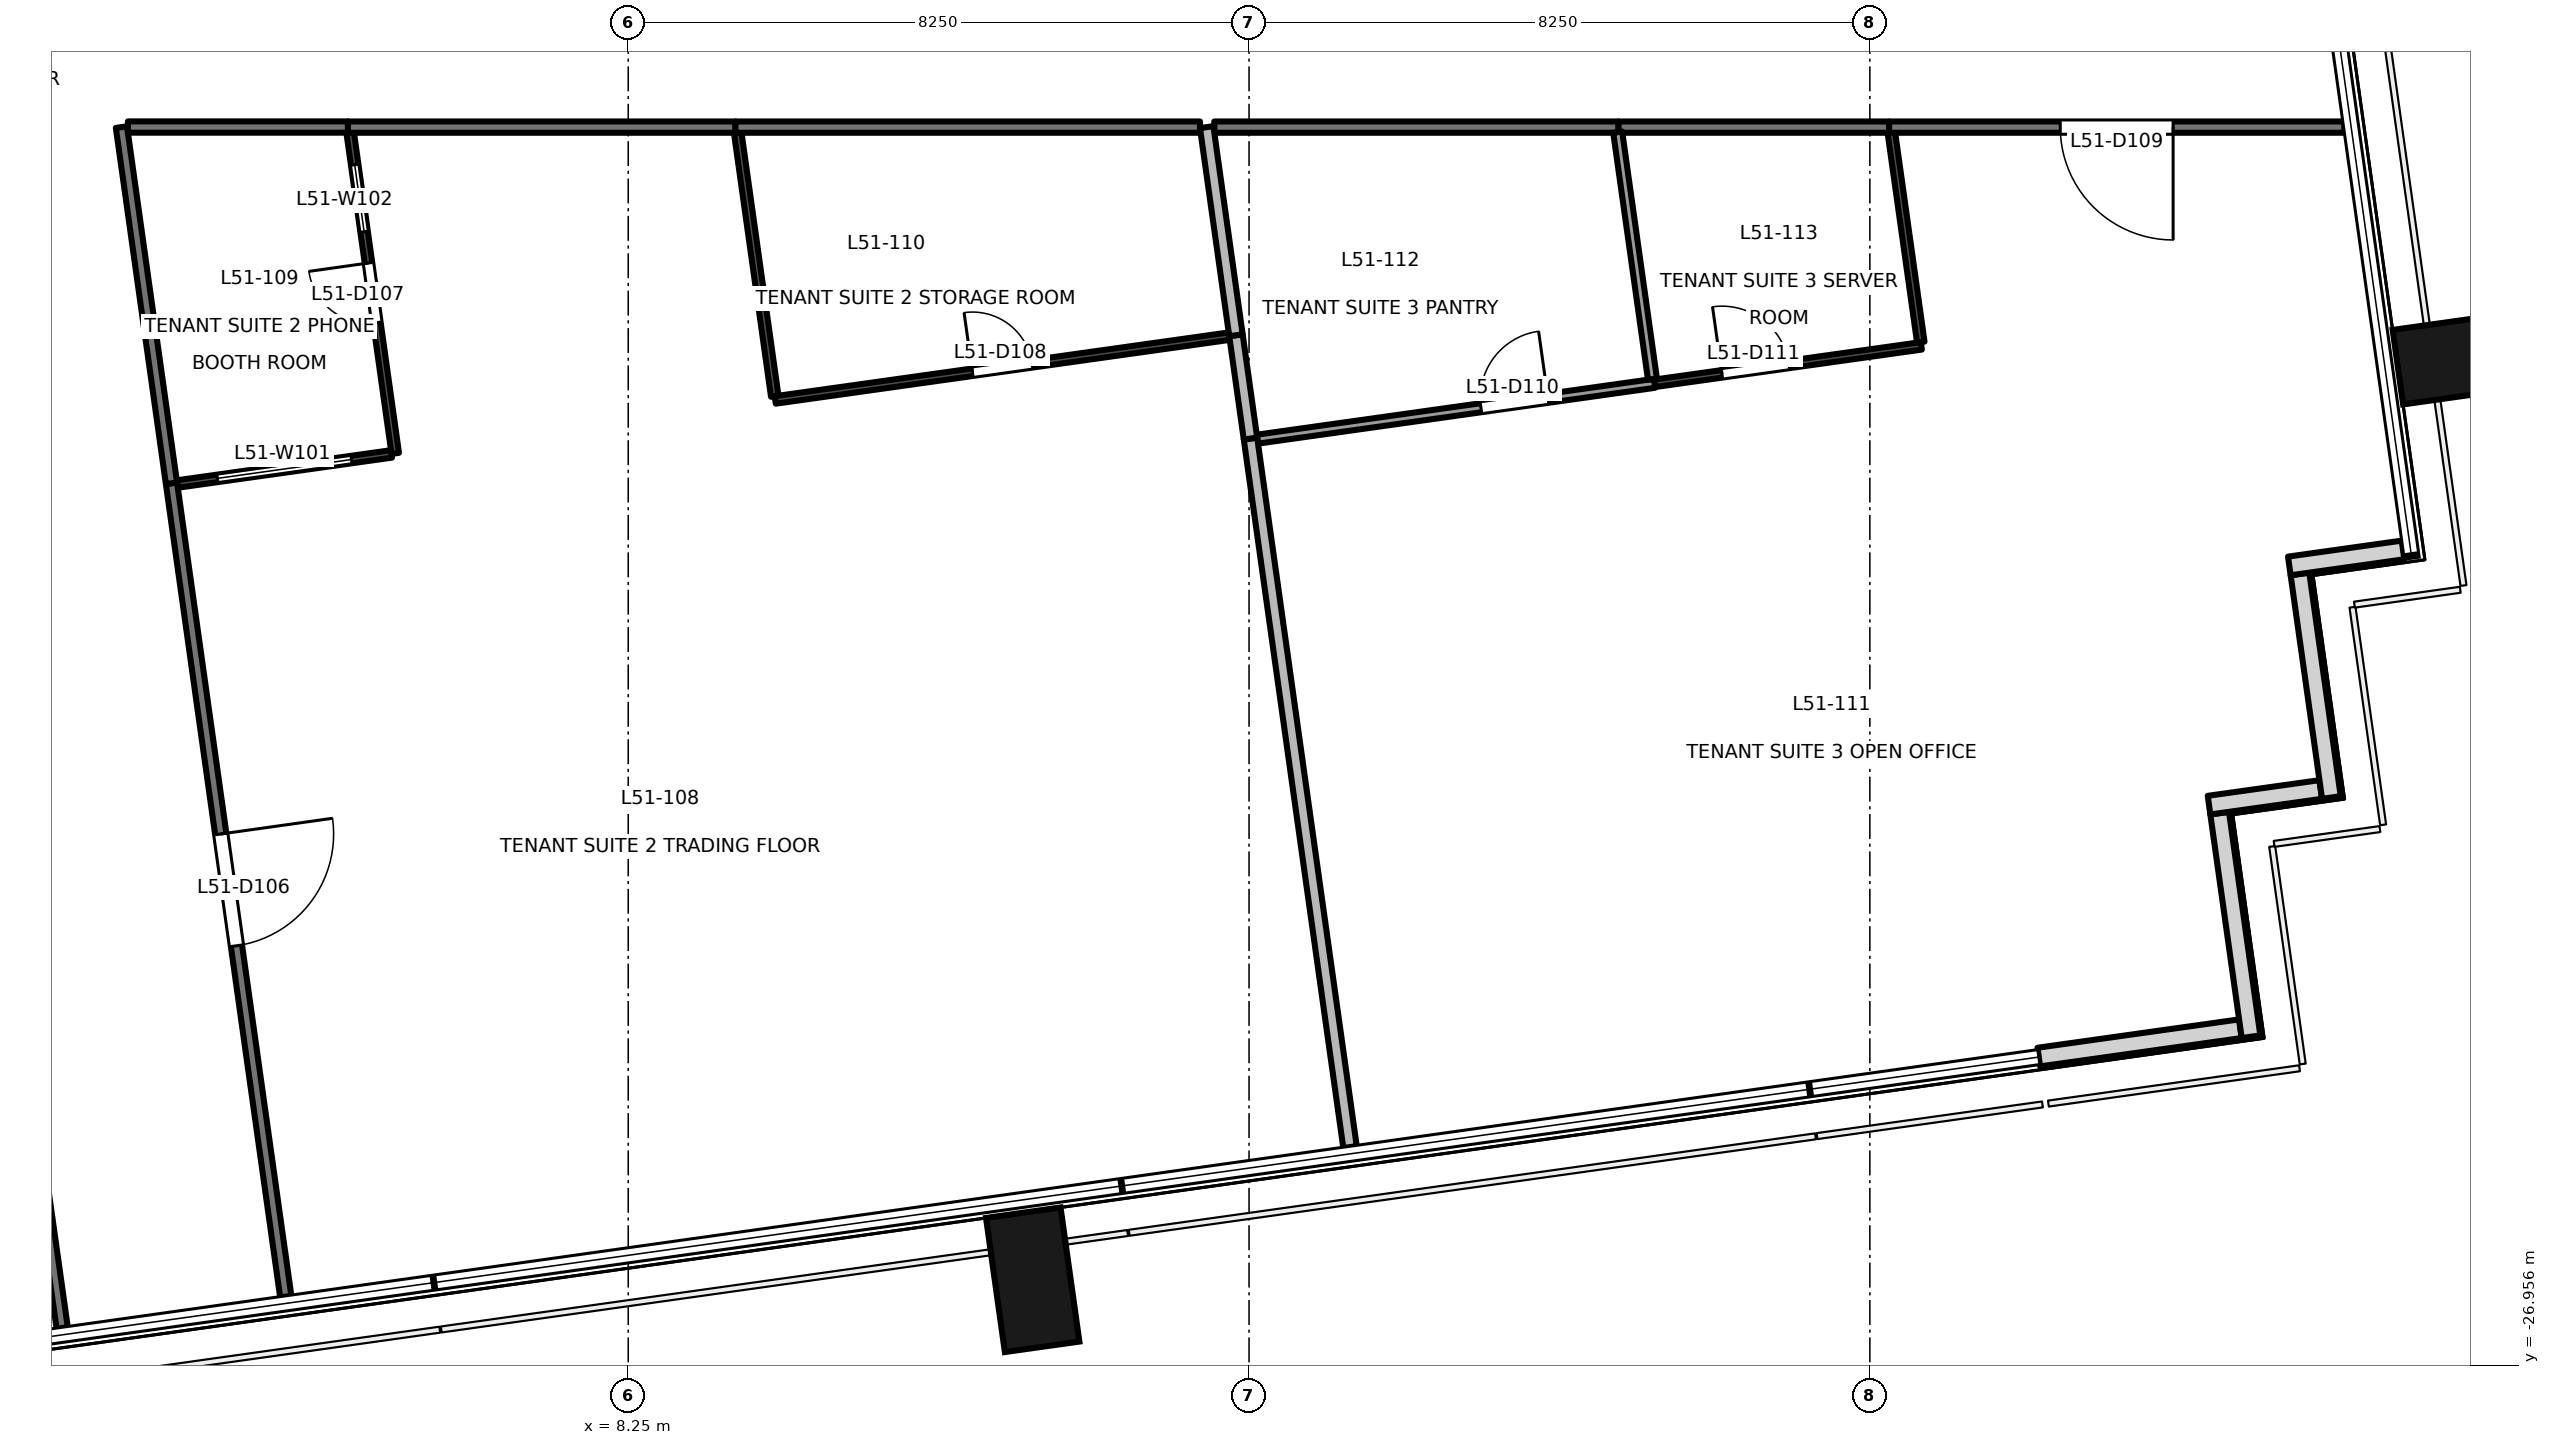
"""IFC4 building model, lengths in metres.
Left out: names, types, materials, properties, quantities, classifications, styles, units other than length and angle.
Written with IfcOpenShell. Run it as: python <this file> out.ifc"""

import sys

from ifc_helpers import new_model, si_unit, direction, frame, frame_2d, origin, origin_2d, place, context, subcontext, project, spatial, rectangle, extrude, element, fill, save


model = new_model("IFC4")
c1 = context("Model", 3, precision=1e-05, world=origin(), true_north=direction((0.0, 1.0)))
c2 = subcontext(c1, "Body", "Model", "MODEL_VIEW")
j1 = project(units=[si_unit("LENGTHUNIT", "METRE"), si_unit("PLANEANGLEUNIT", "RADIAN")], contexts=[c1])
p1 = place(None, origin())
s1 = spatial("IfcSite", under=j1, at=p1, CompositionType="ELEMENT")
p2 = place(p1, origin())
s2 = spatial("IfcBuilding", under=s1, at=p2, CompositionType="ELEMENT")
p3 = place(p2, frame((0.0, 0.0, 225.2)))
s3 = spatial("IfcBuildingStorey", under=s2, at=p3, CompositionType="ELEMENT", Elevation=225.2)
for number, where, z_axis, x_axis in (
    (1, (0.125, -27.716, -0.2), (0.0, 0.0, 1.0), (0.99, 0.139, 0.0)),
    (2, (13.625, -25.818, -0.2), (0.0, 0.0, 1.0), (0.99, 0.139, 0.0)),
    (3, (32.658, -13.565, -0.2), (0.0, 0.0, 1.0), (-0.139, 0.99, 0.0)),
):
    element("IfcColumn", number, at=place(p3, frame(where, z_axis=z_axis, x_axis=x_axis)), inside=s3, PredefinedType="COLUMN", context=c2, shape_type="SweptSolid", body=[
        extrude(rectangle(XDim=1.0, YDim=1.8, at=origin_2d()), origin(), (0.0, 0.0, 1.0), 3.9),
    ])
p4 = place(p3, frame((26.995, -22.859, 0.0), z_axis=(0.0, 0.0, 1.0), x_axis=(0.99024510326, 0.139336411139, 0.0)))
e4 = element("IfcWall", 4, at=p4, inside=s3, PredefinedType="SOLIDWALL", context=c2, shape_type="SweptSolid", body=[
    extrude(rectangle(XDim=2.705, YDim=0.25, at=frame_2d((1.353, 0.0))), origin(), (0.0, 0.0, 1.0), 3.7),
])
p5 = place(p3, frame((29.815, -22.588, 0.0), z_axis=(0.0, 0.0, 1.0), x_axis=(-0.138983028379, 0.9902947631, 0.0)))
e5 = element("IfcWall", 5, at=p5, inside=s3, PredefinedType="SOLIDWALL", context=c2, shape_type="SweptSolid", body=[
    extrude(rectangle(XDim=3.0, YDim=0.25, at=frame_2d((1.5, 0.0))), origin(), (0.0, 0.0, 1.0), 3.7),
])
p6 = place(p3, frame((29.257, -19.51, 0.0), z_axis=(0.0, 0.0, 1.0), x_axis=(0.990330117064, 0.138730887823, 0.0)))
e6 = element("IfcWall", 6, at=p6, inside=s3, PredefinedType="SOLIDWALL", context=c2, shape_type="SweptSolid", body=[
    extrude(rectangle(XDim=1.499, YDim=0.25, at=frame_2d((0.75, 0.0))), origin(), (0.0, 0.0, 1.0), 3.7),
])
p7 = place(p3, frame((30.883, -19.409, 0.0), z_axis=(0.0, 0.0, 1.0), x_axis=(-0.139324658755, 0.990246756855, 0.0)))
e7 = element("IfcWall", 7, at=p7, inside=s3, PredefinedType="SOLIDWALL", context=c2, shape_type="SweptSolid", body=[
    extrude(rectangle(XDim=3.0, YDim=0.25, at=frame_2d((1.5, 0.0))), origin(), (0.0, 0.0, 1.0), 3.7),
])
p8 = place(p3, frame((30.324, -16.332, 0.0), z_axis=(0.0, 0.0, 1.0), x_axis=(0.990238641016, 0.139382329723, 0.0)))
e8 = element("IfcWall", 8, at=p8, inside=s3, PredefinedType="SOLIDWALL", context=c2, shape_type="SweptSolid", body=[
    extrude(rectangle(XDim=1.526, YDim=0.25, at=frame_2d((0.763, 0.0))), origin(), (0.0, 0.0, 1.0), 3.7),
])
p9 = place(p3, frame((0.728, -26.46, 0.0), z_axis=(0.0, 0.0, 1.0), x_axis=(-0.139192487281, 0.990265343978, 0.0)))
e9 = element("IfcWall", 9, at=p9, inside=s3, PredefinedType="PARTITIONING", context=c2, shape_type="SweptSolid", body=[
    extrude(rectangle(XDim=5.46, YDim=0.15, at=frame_2d((2.73, 0.0))), origin(), (0.0, 0.0, 1.0), 2.8),
])
p10 = place(p3, frame((2.18, -15.233, 0.0), z_axis=(0.0, 0.0, 1.0), x_axis=(0.139166413059, -0.990269008642, 0.0)))
e10 = element("IfcWall", 10, at=p10, inside=s3, PredefinedType="PARTITIONING", context=c2, shape_type="SweptSolid", body=[
    extrude(rectangle(XDim=10.915, YDim=0.15, at=frame_2d((5.458, 0.0))), origin(), (0.0, 0.0, 1.0), 3.7),
])
p11 = place(p10, frame((4.707, 0.0, 0.0)))
e11 = element("IfcOpeningElement", 11, at=p11, cuts=e10, PredefinedType="OPENING", context=c2, shape_type="SweptSolid", body=[
    extrude(rectangle(XDim=1.5, YDim=2.1, at=frame_2d((0.75, 1.05))), frame((0.0, 0.085, 0.0), z_axis=(0.0, -1.0, 0.0), x_axis=(1.0, 0.0, 0.0)), (0.0, 0.0, 1.0), 0.171),
])
p12 = place(p3, frame((9.675, -10.5, 0.0), z_axis=(0.0, 0.0, 1.0), x_axis=(-1.0, 0.0, 0.0)))
e12 = element("IfcWall", 12, at=p12, inside=s3, PredefinedType="PARTITIONING", context=c2, shape_type="SweptSolid", body=[
    extrude(rectangle(XDim=5.151, YDim=0.15, at=frame_2d((2.576, 0.0))), origin(), (0.0, 0.0, 1.0), 2.8),
])
p13 = place(p3, frame((1.515, -10.5, 0.0), z_axis=(0.0, 0.0, 1.0), x_axis=(0.139146821365, -0.990271761742, 0.0)))
e13 = element("IfcWall", 13, at=p13, inside=s3, PredefinedType="PARTITIONING", context=c2, shape_type="SweptSolid", body=[
    extrude(rectangle(XDim=4.779, YDim=0.15, at=frame_2d((2.39, 0.0))), origin(), (0.0, 0.0, 1.0), 3.7),
])
p14 = place(p3, frame((4.524, -10.499, 0.0), z_axis=(0.0, 0.0, 1.0), x_axis=(-1.0, 0.0, 0.0)))
e14 = element("IfcWall", 14, at=p14, inside=s3, PredefinedType="PARTITIONING", context=c2, shape_type="SweptSolid", body=[
    extrude(rectangle(XDim=2.923, YDim=0.15, at=frame_2d((1.461, 0.0))), origin(), (0.0, 0.0, 1.0), 2.8),
])
p15 = place(p3, frame((15.848, -10.5, 0.0), z_axis=(0.0, 0.0, 1.0), x_axis=(-1.0, 0.0, 0.0)))
e15 = element("IfcWall", 15, at=p15, inside=s3, PredefinedType="PARTITIONING", context=c2, shape_type="SweptSolid", body=[
    extrude(rectangle(XDim=6.173, YDim=0.15, at=frame_2d((3.086, 0.0))), origin(), (0.0, 0.0, 1.0), 2.9),
])
p16 = place(p3, frame((31.055, -10.5, 0.0), z_axis=(0.0, 0.0, 1.0), x_axis=(-1.0, 0.0, 0.0)))
e16 = element("IfcWall", 16, at=p16, inside=s3, PredefinedType="PARTITIONING", context=c2, shape_type="SweptSolid", body=[
    extrude(rectangle(XDim=6.05, YDim=0.15, at=frame_2d((3.025, 0.0))), origin(), (0.0, 0.0, 1.0), 3.7),
])
p17 = place(p16, frame((2.275, 0.0, 0.0)))
e17 = element("IfcOpeningElement", 17, at=p17, cuts=e16, PredefinedType="OPENING", context=c2, shape_type="SweptSolid", body=[
    extrude(rectangle(XDim=1.5, YDim=2.1, at=frame_2d((0.75, 1.05))), frame((0.0, 0.085, 0.0), z_axis=(0.0, -1.0, 0.0), x_axis=(1.0, 0.0, 0.0)), (0.0, 0.0, 1.0), 0.171),
])
p18 = place(p3, frame((21.41, -10.5, 0.0), z_axis=(0.0, 0.0, 1.0), x_axis=(-1.0, 0.0, 0.0)))
e18 = element("IfcWall", 18, at=p18, inside=s3, PredefinedType="PARTITIONING", context=c2, shape_type="SweptSolid", body=[
    extrude(rectangle(XDim=5.372, YDim=0.15, at=frame_2d((2.686, 0.0))), origin(), (0.0, 0.0, 1.0), 3.7),
])
p19 = place(p3, frame((25.005, -10.5, 0.0), z_axis=(0.0, 0.0, 1.0), x_axis=(-1.0, 0.0, 0.0)))
e19 = element("IfcWall", 19, at=p19, inside=s3, PredefinedType="PARTITIONING", context=c2, shape_type="SweptSolid", body=[
    extrude(rectangle(XDim=3.595, YDim=0.15, at=frame_2d((1.797, 0.0))), origin(), (0.0, 0.0, 1.0), 3.7),
])
p20 = place(p3, frame((2.258, -15.243, 0.0), z_axis=(0.0, 0.0, 1.0), x_axis=(0.990271399447, 0.139149399699, 0.0)))
e20 = element("IfcWall", 20, at=p20, inside=s3, PredefinedType="PARTITIONING", context=c2, shape_type="SweptSolid", body=[
    extrude(rectangle(XDim=2.874, YDim=0.1, at=frame_2d((1.437, 0.0))), origin(), (0.0, 0.0, 1.0), 2.8),
])
p21 = place(p20, frame((0.537, 0.0, 0.9)))
e21 = element("IfcOpeningElement", 21, at=p21, cuts=e20, PredefinedType="OPENING", context=c2, shape_type="SweptSolid", body=[
    extrude(rectangle(XDim=1.8, YDim=1.2, at=frame_2d((0.9, 0.6))), frame((0.0, 0.061, 0.0), z_axis=(0.0, -1.0, 0.0), x_axis=(1.0, 0.0, 0.0)), (0.0, 0.0, 1.0), 0.121),
])
p22 = place(p3, frame((5.154, -14.836, 0.0), z_axis=(0.0, 0.0, 1.0), x_axis=(-0.139240076126, 0.990258653686, 0.0)))
e22 = element("IfcWall", 22, at=p22, inside=s3, PredefinedType="PARTITIONING", context=c2, shape_type="SweptSolid", body=[
    extrude(rectangle(XDim=4.31, YDim=0.1, at=frame_2d((2.155, 0.0))), origin(), (0.0, 0.0, 1.0), 2.8),
])
p23 = place(p22, frame((1.755, 0.0, 0.0)))
e23 = element("IfcOpeningElement", 23, at=p23, cuts=e22, PredefinedType="OPENING", context=c2, shape_type="SweptSolid", body=[
    extrude(rectangle(XDim=0.8, YDim=2.1, at=frame_2d((0.4, 1.05))), frame((0.0, 0.061, 0.0), z_axis=(0.0, -1.0, 0.0), x_axis=(1.0, 0.0, 0.0)), (0.0, 0.0, 1.0), 0.121),
])
p24 = place(p22, frame((2.974, 0.0, 0.9)))
e24 = element("IfcOpeningElement", 24, at=p24, cuts=e22, PredefinedType="OPENING", context=c2, shape_type="SweptSolid", body=[
    extrude(rectangle(XDim=0.9, YDim=1.2, at=frame_2d((0.45, 0.6))), frame((0.0, 0.061, 0.0), z_axis=(0.0, -1.0, 0.0), x_axis=(1.0, 0.0, 0.0)), (0.0, 0.0, 1.0), 0.121),
])
p25 = place(p3, frame((9.704, -10.568, 0.0), z_axis=(0.0, 0.0, 1.0), x_axis=(0.139115473097, -0.9902761661, 0.0)))
e25 = element("IfcWall", 25, at=p25, inside=s3, PredefinedType="PARTITIONING", context=c2, shape_type="SweptSolid", body=[
    extrude(rectangle(XDim=3.543, YDim=0.1, at=frame_2d((1.771, 0.0))), origin(), (0.0, 0.0, 1.0), 3.7),
])
p26 = place(p3, frame((10.204, -14.126, 0.0), z_axis=(0.0, 0.0, 1.0), x_axis=(0.99026754166, 0.139176851288, 0.0)))
e26 = element("IfcWall", 26, at=p26, inside=s3, PredefinedType="PARTITIONING", context=c2, shape_type="SweptSolid", body=[
    extrude(rectangle(XDim=6.092, YDim=0.1, at=frame_2d((3.046, 0.0))), origin(), (0.0, 0.0, 1.0), 2.9),
])
p27 = place(p26, frame((2.646, 0.0, 0.0)))
e27 = element("IfcOpeningElement", 27, at=p27, cuts=e26, PredefinedType="OPENING", context=c2, shape_type="SweptSolid", body=[
    extrude(rectangle(XDim=0.8, YDim=2.1, at=frame_2d((0.4, 1.05))), frame((0.0, 0.061, 0.0), z_axis=(0.0, -1.0, 0.0), x_axis=(1.0, 0.0, 0.0)), (0.0, 0.0, 1.0), 0.121),
])
p28 = place(p3, frame((16.519, -14.639, 0.0), z_axis=(0.0, 0.0, 1.0), x_axis=(0.139138381639, -0.990272947603, 0.0)))
e28 = element("IfcWall", 28, at=p28, inside=s3, PredefinedType="PARTITIONING", context=c2, shape_type="SweptSolid", body=[
    extrude(rectangle(XDim=9.509, YDim=0.18, at=frame_2d((4.754, 0.0))), origin(), (0.0, 0.0, 1.0), 3.7),
])
p29 = place(p3, frame((16.326, -13.266, 0.0), z_axis=(0.0, 0.0, 1.0), x_axis=(0.13930070257, -0.990250127121, 0.0)))
e29 = element("IfcWall", 29, at=p29, inside=s3, PredefinedType="PARTITIONING", context=c2, shape_type="SweptSolid", body=[
    extrude(rectangle(XDim=1.386, YDim=0.18, at=frame_2d((0.693, 0.0))), origin(), (0.0, 0.0, 1.0), 3.7),
])
p30 = place(p3, frame((15.937, -10.5, 0.0), z_axis=(0.0, 0.0, 1.0), x_axis=(0.139230726348, -0.990259968312, 0.0)))
e30 = element("IfcWall", 30, at=p30, inside=s3, PredefinedType="PARTITIONING", context=c2, shape_type="SweptSolid", body=[
    extrude(rectangle(XDim=2.793, YDim=0.18, at=frame_2d((1.396, 0.0))), origin(), (0.0, 0.0, 1.0), 3.7),
])
p31 = place(p3, frame((16.611, -14.647, 0.0), z_axis=(0.0, 0.0, 1.0), x_axis=(0.990263091894, 0.139208508477, 0.0)))
e31 = element("IfcWall", 31, at=p31, inside=s3, PredefinedType="PARTITIONING", context=c2, shape_type="SweptSolid", body=[
    extrude(rectangle(XDim=5.33, YDim=0.12, at=frame_2d((2.665, 0.0))), origin(), (0.0, 0.0, 1.0), 3.7),
])
p32 = place(p31, frame((3.0, 0.0, 0.0)))
e32 = element("IfcOpeningElement", 32, at=p32, cuts=e31, PredefinedType="OPENING", context=c2, shape_type="SweptSolid", body=[
    extrude(rectangle(XDim=0.9, YDim=2.1, at=frame_2d((0.45, 1.05))), frame((0.0, 0.071, 0.0), z_axis=(0.0, -1.0, 0.0), x_axis=(1.0, 0.0, 0.0)), (0.0, 0.0, 1.0), 0.141),
])
p33 = place(p3, frame((21.889, -13.905, 0.0), z_axis=(0.0, 0.0, 1.0), x_axis=(0.990275524816, 0.139120037919, 0.0)))
e33 = element("IfcWall", 33, at=p33, inside=s3, PredefinedType="PARTITIONING", context=c2, shape_type="SweptSolid", body=[
    extrude(rectangle(XDim=3.58, YDim=0.1, at=frame_2d((1.79, 0.0))), origin(), (0.0, 0.0, 1.0), 3.7),
])
p34 = place(p33, frame((0.904, 0.0, 0.0)))
e34 = element("IfcOpeningElement", 34, at=p34, cuts=e33, PredefinedType="OPENING", context=c2, shape_type="SweptSolid", body=[
    extrude(rectangle(XDim=0.9, YDim=2.1, at=frame_2d((0.45, 1.05))), frame((0.0, 0.061, 0.0), z_axis=(0.0, -1.0, 0.0), x_axis=(1.0, 0.0, 0.0)), (0.0, 0.0, 1.0), 0.121),
])
p35 = place(p3, frame((25.427, -13.358, 0.0), z_axis=(0.0, 0.0, 1.0), x_axis=(-0.139176490191, 0.99026759241, 0.0)))
e35 = element("IfcWall", 35, at=p35, inside=s3, PredefinedType="PARTITIONING", context=c2, shape_type="SweptSolid", body=[
    extrude(rectangle(XDim=2.817, YDim=0.1, at=frame_2d((1.409, 0.0))), origin(), (0.0, 0.0, 1.0), 3.7),
])
p36 = place(p3, frame((21.399, -10.567, 0.0), z_axis=(0.0, 0.0, 1.0), x_axis=(0.139430884239, -0.990231805448, 0.0)))
e36 = element("IfcWall", 36, at=p36, inside=s3, PredefinedType="PARTITIONING", context=c2, shape_type="SweptSolid", body=[
    extrude(rectangle(XDim=3.315, YDim=0.12, at=frame_2d((1.657, 0.0))), origin(), (0.0, 0.0, 1.0), 3.7),
])
p37 = place(p11, origin())
e37 = element("IfcDoor", 37, at=p37, inside=s3, OperationType="DOUBLE_DOOR_SINGLE_SWING", PredefinedType="DOOR", context=c2, shape_type="SweptSolid", body=[
    extrude(rectangle(XDim=1.5, YDim=2.1, at=frame_2d((0.75, 1.05))), frame((0.0, 0.025, 0.0), z_axis=(0.0, -1.0, 0.0), x_axis=(1.0, 0.0, 0.0)), (0.0, 0.0, 1.0), 0.05),
])
fill(e11, e37)
p38 = place(p23, origin())
e38 = element("IfcDoor", 38, at=p38, inside=s3, OperationType="SINGLE_SWING_RIGHT", PredefinedType="DOOR", context=c2, shape_type="SweptSolid", body=[
    extrude(rectangle(XDim=0.8, YDim=2.1, at=frame_2d((0.4, 1.05))), frame((0.0, 0.025, 0.0), z_axis=(0.0, -1.0, 0.0), x_axis=(1.0, 0.0, 0.0)), (0.0, 0.0, 1.0), 0.05),
])
fill(e23, e38)
p39 = place(p27, origin())
e39 = element("IfcDoor", 39, at=p39, inside=s3, OperationType="SINGLE_SWING_LEFT", PredefinedType="DOOR", context=c2, shape_type="SweptSolid", body=[
    extrude(rectangle(XDim=0.8, YDim=2.1, at=frame_2d((0.4, 1.05))), frame((0.0, 0.025, 0.0), z_axis=(0.0, -1.0, 0.0), x_axis=(1.0, 0.0, 0.0)), (0.0, 0.0, 1.0), 0.05),
])
fill(e27, e39)
p40 = place(p17, origin())
e40 = element("IfcDoor", 40, at=p40, inside=s3, OperationType="DOUBLE_DOOR_SINGLE_SWING", PredefinedType="DOOR", context=c2, shape_type="SweptSolid", body=[
    extrude(rectangle(XDim=1.5, YDim=2.1, at=frame_2d((0.75, 1.05))), frame((0.0, 0.025, 0.0), z_axis=(0.0, -1.0, 0.0), x_axis=(1.0, 0.0, 0.0)), (0.0, 0.0, 1.0), 0.05),
])
fill(e17, e40)
p41 = place(p32, origin())
e41 = element("IfcDoor", 41, at=p41, inside=s3, OperationType="SINGLE_SWING_RIGHT", PredefinedType="DOOR", context=c2, shape_type="SweptSolid", body=[
    extrude(rectangle(XDim=0.9, YDim=2.1, at=frame_2d((0.45, 1.05))), frame((0.0, 0.025, 0.0), z_axis=(0.0, -1.0, 0.0), x_axis=(1.0, 0.0, 0.0)), (0.0, 0.0, 1.0), 0.05),
])
fill(e32, e41)
p42 = place(p34, origin())
e42 = element("IfcDoor", 42, at=p42, inside=s3, OperationType="SINGLE_SWING_LEFT", PredefinedType="DOOR", context=c2, shape_type="SweptSolid", body=[
    extrude(rectangle(XDim=0.9, YDim=2.1, at=frame_2d((0.45, 1.05))), frame((0.0, 0.025, 0.0), z_axis=(0.0, -1.0, 0.0), x_axis=(1.0, 0.0, 0.0)), (0.0, 0.0, 1.0), 0.05),
])
fill(e34, e42)
p43 = place(p21, origin())
e43 = element("IfcWindow", 43, at=p43, inside=s3, PartitioningType="SINGLE_PANEL", PredefinedType="WINDOW", context=c2, shape_type="SweptSolid", body=[
    extrude(rectangle(XDim=1.8, YDim=1.2, at=frame_2d((0.9, 0.6))), frame((0.0, 0.03, 0.0), z_axis=(0.0, -1.0, 0.0), x_axis=(1.0, 0.0, 0.0)), (0.0, 0.0, 1.0), 0.06),
])
fill(e21, e43)
p44 = place(p24, origin())
e44 = element("IfcWindow", 44, at=p44, inside=s3, PartitioningType="SINGLE_PANEL", PredefinedType="WINDOW", context=c2, shape_type="SweptSolid", body=[
    extrude(rectangle(XDim=0.9, YDim=1.2, at=frame_2d((0.45, 0.6))), frame((0.0, 0.03, 0.0), z_axis=(0.0, -1.0, 0.0), x_axis=(1.0, 0.0, 0.0)), (0.0, 0.0, 1.0), 0.06),
])
fill(e24, e44)
save(model, sys.argv[1])
